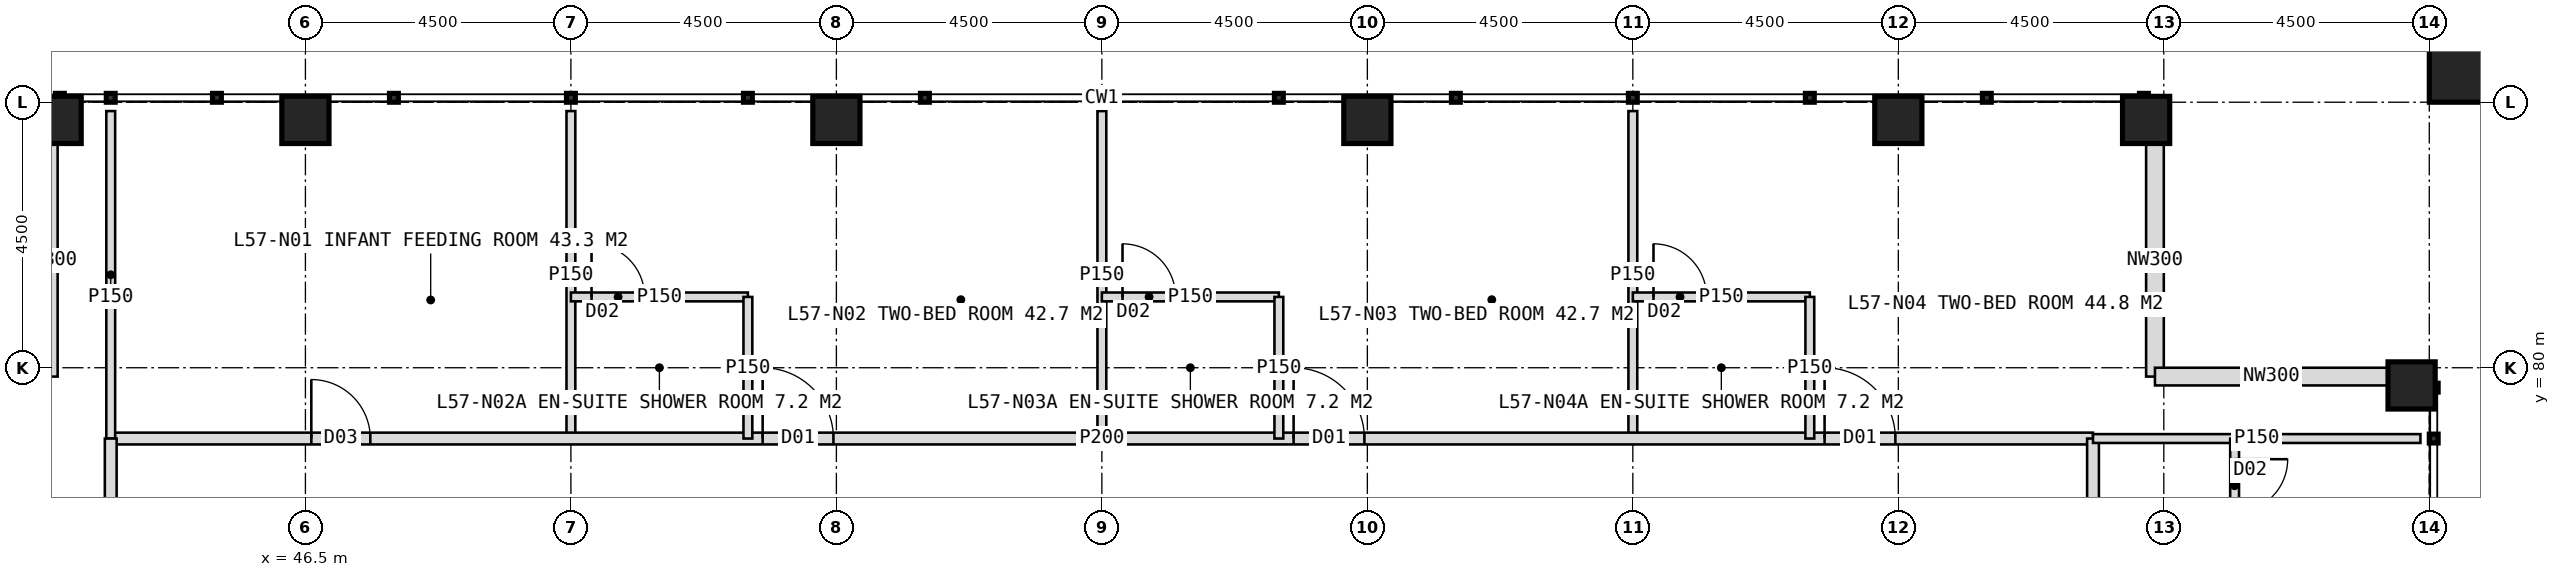
"""IFC4 building model, lengths in metres.
Left out: names, types, materials, properties, quantities, classifications, styles, units other than length and angle.
Written with IfcOpenShell. Run it as: python <this file> out.ifc"""

import sys

from ifc_helpers import new_model, si_unit, direction, frame, frame_2d, origin, origin_2d, place, context, subcontext, project, spatial, rectangle, hollow_rectangle, extrude, element, fill, save


model = new_model("IFC4")
c1 = context("Model", 3, precision=1e-05, world=origin(), true_north=direction((0.0, 1.0)))
c2 = subcontext(c1, "Body", "Model", "MODEL_VIEW")
j1 = project(units=[si_unit("LENGTHUNIT", "METRE"), si_unit("PLANEANGLEUNIT", "RADIAN")], contexts=[c1])
p1 = place(None, origin())
s1 = spatial("IfcSite", under=j1, at=p1, CompositionType="ELEMENT")
p2 = place(p1, origin())
s2 = spatial("IfcBuilding", under=s1, at=p2, CompositionType="ELEMENT")
p3 = place(p2, frame((0.0, 0.0, 237.0)))
s3 = spatial("IfcBuildingStorey", under=s2, at=p3, CompositionType="ELEMENT", Elevation=237.0)
for number, where, z_axis, x_axis in (
    (1, (42.3, 84.2, 0.0), (0.0, 0.0, 1.0), (1.0, 0.0, 0.0)),
    (2, (46.5, 84.2, 0.0), (0.0, 0.0, 1.0), (1.0, 0.0, 0.0)),
    (3, (55.5, 84.2, 0.0), (0.0, 0.0, 1.0), (1.0, 0.0, 0.0)),
    (4, (64.5, 84.2, 0.0), (0.0, 0.0, 1.0), (1.0, 0.0, 0.0)),
    (5, (73.5, 84.2, 0.0), (0.0, 0.0, 1.0), (1.0, 0.0, 0.0)),
    (6, (77.7, 84.2, 0.0), (0.0, 0.0, 1.0), (1.0, 0.0, 0.0)),
    (7, (82.2, 79.7, 0.0), (0.0, 0.0, 1.0), (1.0, 0.0, 0.0)),
):
    element("IfcColumn", number, at=place(p3, frame(where, z_axis=z_axis, x_axis=x_axis)), inside=s3, PredefinedType="COLUMN", context=c2, shape_type="SweptSolid", body=[
        extrude(hollow_rectangle(XDim=0.8, YDim=0.8, WallThickness=0.08, at=origin_2d()), origin(), (0.0, 0.0, 1.0), 4.0),
    ])
p4 = place(p3, frame((83.1, 85.1, 0.0), z_axis=(0.0, 0.0, 1.0), x_axis=(1.0, 0.0, 0.0)))
e8 = element("IfcColumn", 8, at=p4, inside=s3, PredefinedType="COLUMN", context=c2, shape_type="SweptSolid", body=[
    extrude(hollow_rectangle(XDim=1.2, YDim=1.2, WallThickness=0.07, at=origin_2d()), origin(), (0.0, 0.0, 1.0), 4.0),
])
for number, where, z_axis, x_axis in (
    (9, (77.85, 83.8, 0.0), (0.0, 0.0, 1.0), (0.0, -1.0, 0.0)),
    (10, (77.85, 79.85, 0.0), (0.0, 0.0, 1.0), (1.0, 0.0, 0.0)),
    (11, (42.15, 79.85, 0.0), (0.0, 0.0, 1.0), (0.0, 1.0, 0.0)),
):
    element("IfcWall", number, at=place(p3, frame(where, z_axis=z_axis, x_axis=x_axis)), inside=s3, PredefinedType="ELEMENTEDWALL", context=c2, shape_type="SweptSolid", body=[
        extrude(rectangle(XDim=3.95, YDim=0.3, at=frame_2d((1.975, 0.0))), origin(), (0.0, 0.0, 1.0), 2.85),
    ])
p5 = place(p3, frame((51.0, 78.8, 0.0), z_axis=(0.0, 0.0, 1.0), x_axis=(0.0, 1.0, 0.0)))
e12 = element("IfcWall", 12, at=p5, inside=s3, PredefinedType="PARTITIONING", context=c2, shape_type="SweptSolid", body=[
    extrude(rectangle(XDim=5.55, YDim=0.15, at=frame_2d((2.775, 0.0))), origin(), (0.0, 0.0, 1.0), 3.75),
])
p6 = place(p3, frame((60.0, 78.8, 0.0), z_axis=(0.0, 0.0, 1.0), x_axis=(0.0, 1.0, 0.0)))
e13 = element("IfcWall", 13, at=p6, inside=s3, PredefinedType="PARTITIONING", context=c2, shape_type="SweptSolid", body=[
    extrude(rectangle(XDim=5.55, YDim=0.15, at=frame_2d((2.775, 0.0))), origin(), (0.0, 0.0, 1.0), 2.95),
])
p7 = place(p3, frame((69.0, 78.8, 0.0), z_axis=(0.0, 0.0, 1.0), x_axis=(0.0, 1.0, 0.0)))
e14 = element("IfcWall", 14, at=p7, inside=s3, PredefinedType="PARTITIONING", context=c2, shape_type="SweptSolid", body=[
    extrude(rectangle(XDim=5.55, YDim=0.15, at=frame_2d((2.775, 0.0))), origin(), (0.0, 0.0, 1.0), 3.75),
])
p8 = place(p3, frame((43.2, 78.8, 0.0), z_axis=(0.0, 0.0, 1.0), x_axis=(1.0, 0.0, 0.0)))
e15 = element("IfcWall", 15, at=p8, inside=s3, PredefinedType="PARTITIONING", context=c2, shape_type="SweptSolid", body=[
    extrude(rectangle(XDim=33.6, YDim=0.2, at=frame_2d((16.8, 0.0))), origin(), (0.0, 0.0, 1.0), 3.75),
])
p9 = place(p8, frame((3.4, 0.0, 0.0)))
e16 = element("IfcOpeningElement", 16, at=p9, cuts=e15, PredefinedType="OPENING", context=c2, shape_type="SweptSolid", body=[
    extrude(rectangle(XDim=1.0, YDim=2.1, at=frame_2d((0.5, 1.05))), frame((0.0, 0.11, 0.0), z_axis=(0.0, -1.0, 0.0), x_axis=(1.0, 0.0, 0.0)), (0.0, 0.0, 1.0), 0.22),
])
p10 = place(p8, frame((11.05, 0.0, 0.0)))
e17 = element("IfcOpeningElement", 17, at=p10, cuts=e15, PredefinedType="OPENING", context=c2, shape_type="SweptSolid", body=[
    extrude(rectangle(XDim=1.2, YDim=2.2, at=frame_2d((0.6, 1.1))), frame((0.0, 0.11, 0.0), z_axis=(0.0, -1.0, 0.0), x_axis=(1.0, 0.0, 0.0)), (0.0, 0.0, 1.0), 0.22),
])
p11 = place(p8, frame((20.05, 0.0, 0.0)))
e18 = element("IfcOpeningElement", 18, at=p11, cuts=e15, PredefinedType="OPENING", context=c2, shape_type="SweptSolid", body=[
    extrude(rectangle(XDim=1.2, YDim=2.2, at=frame_2d((0.6, 1.1))), frame((0.0, 0.11, 0.0), z_axis=(0.0, -1.0, 0.0), x_axis=(1.0, 0.0, 0.0)), (0.0, 0.0, 1.0), 0.22),
])
p12 = place(p8, frame((29.05, 0.0, 0.0)))
e19 = element("IfcOpeningElement", 19, at=p12, cuts=e15, PredefinedType="OPENING", context=c2, shape_type="SweptSolid", body=[
    extrude(rectangle(XDim=1.2, YDim=2.2, at=frame_2d((0.6, 1.1))), frame((0.0, 0.11, 0.0), z_axis=(0.0, -1.0, 0.0), x_axis=(1.0, 0.0, 0.0)), (0.0, 0.0, 1.0), 0.22),
])
p13 = place(p3, frame((43.2, 78.8, 0.0), z_axis=(0.0, 0.0, 1.0), x_axis=(0.0, 1.0, 0.0)))
e20 = element("IfcWall", 20, at=p13, inside=s3, PredefinedType="PARTITIONING", context=c2, shape_type="SweptSolid", body=[
    extrude(rectangle(XDim=5.55, YDim=0.15, at=frame_2d((2.775, 0.0))), origin(), (0.0, 0.0, 1.0), 3.75),
])
p14 = place(p3, frame((51.0, 81.2, 0.0), z_axis=(0.0, 0.0, 1.0), x_axis=(1.0, 0.0, 0.0)))
e21 = element("IfcWall", 21, at=p14, inside=s3, PredefinedType="PARTITIONING", context=c2, shape_type="SweptSolid", body=[
    extrude(rectangle(XDim=3.0, YDim=0.15, at=frame_2d((1.5, 0.0))), origin(), (0.0, 0.0, 1.0), 3.75),
])
p15 = place(p14, frame((0.35, 0.0, 0.0)))
e22 = element("IfcOpeningElement", 22, at=p15, cuts=e21, PredefinedType="OPENING", context=c2, shape_type="SweptSolid", body=[
    extrude(rectangle(XDim=0.9, YDim=2.1, at=frame_2d((0.45, 1.05))), frame((0.0, 0.085, 0.0), z_axis=(0.0, -1.0, 0.0), x_axis=(1.0, 0.0, 0.0)), (0.0, 0.0, 1.0), 0.17),
])
p16 = place(p3, frame((54.0, 78.8, 0.0), z_axis=(0.0, 0.0, 1.0), x_axis=(0.0, 1.0, 0.0)))
e23 = element("IfcWall", 23, at=p16, inside=s3, PredefinedType="PARTITIONING", context=c2, shape_type="SweptSolid", body=[
    extrude(rectangle(XDim=2.4, YDim=0.15, at=frame_2d((1.2, 0.0))), origin(), (0.0, 0.0, 1.0), 3.75),
])
p17 = place(p3, frame((60.0, 81.2, 0.0), z_axis=(0.0, 0.0, 1.0), x_axis=(1.0, 0.0, 0.0)))
e24 = element("IfcWall", 24, at=p17, inside=s3, PredefinedType="PARTITIONING", context=c2, shape_type="SweptSolid", body=[
    extrude(rectangle(XDim=3.0, YDim=0.15, at=frame_2d((1.5, 0.0))), origin(), (0.0, 0.0, 1.0), 3.75),
])
p18 = place(p17, frame((0.35, 0.0, 0.0)))
e25 = element("IfcOpeningElement", 25, at=p18, cuts=e24, PredefinedType="OPENING", context=c2, shape_type="SweptSolid", body=[
    extrude(rectangle(XDim=0.9, YDim=2.1, at=frame_2d((0.45, 1.05))), frame((0.0, 0.085, 0.0), z_axis=(0.0, -1.0, 0.0), x_axis=(1.0, 0.0, 0.0)), (0.0, 0.0, 1.0), 0.17),
])
p19 = place(p3, frame((63.0, 78.8, 0.0), z_axis=(0.0, 0.0, 1.0), x_axis=(0.0, 1.0, 0.0)))
e26 = element("IfcWall", 26, at=p19, inside=s3, PredefinedType="PARTITIONING", context=c2, shape_type="SweptSolid", body=[
    extrude(rectangle(XDim=2.4, YDim=0.15, at=frame_2d((1.2, 0.0))), origin(), (0.0, 0.0, 1.0), 3.75),
])
p20 = place(p3, frame((69.0, 81.2, 0.0), z_axis=(0.0, 0.0, 1.0), x_axis=(1.0, 0.0, 0.0)))
e27 = element("IfcWall", 27, at=p20, inside=s3, PredefinedType="PARTITIONING", context=c2, shape_type="SweptSolid", body=[
    extrude(rectangle(XDim=3.0, YDim=0.15, at=frame_2d((1.5, 0.0))), origin(), (0.0, 0.0, 1.0), 3.75),
])
p21 = place(p20, frame((0.35, 0.0, 0.0)))
e28 = element("IfcOpeningElement", 28, at=p21, cuts=e27, PredefinedType="OPENING", context=c2, shape_type="SweptSolid", body=[
    extrude(rectangle(XDim=0.9, YDim=2.1, at=frame_2d((0.45, 1.05))), frame((0.0, 0.085, 0.0), z_axis=(0.0, -1.0, 0.0), x_axis=(1.0, 0.0, 0.0)), (0.0, 0.0, 1.0), 0.17),
])
p22 = place(p3, frame((72.0, 78.8, 0.0), z_axis=(0.0, 0.0, 1.0), x_axis=(0.0, 1.0, 0.0)))
e29 = element("IfcWall", 29, at=p22, inside=s3, PredefinedType="PARTITIONING", context=c2, shape_type="SweptSolid", body=[
    extrude(rectangle(XDim=2.4, YDim=0.15, at=frame_2d((1.2, 0.0))), origin(), (0.0, 0.0, 1.0), 3.75),
])
p23 = place(p3, frame((43.2, 45.2, 0.0), z_axis=(0.0, 0.0, 1.0), x_axis=(0.0, 1.0, 0.0)))
e30 = element("IfcWall", 30, at=p23, inside=s3, PredefinedType="PARTITIONING", context=c2, shape_type="SweptSolid", body=[
    extrude(rectangle(XDim=33.6, YDim=0.2, at=frame_2d((16.8, 0.0))), origin(), (0.0, 0.0, 1.0), 3.75),
])
p24 = place(p23, frame((2.65, 0.0, 0.0)))
e31 = element("IfcOpeningElement", 31, at=p24, cuts=e30, PredefinedType="OPENING", context=c2, shape_type="SweptSolid", body=[
    extrude(rectangle(XDim=1.2, YDim=2.2, at=frame_2d((0.6, 1.1))), frame((0.0, 0.11, 0.0), z_axis=(0.0, -1.0, 0.0), x_axis=(1.0, 0.0, 0.0)), (0.0, 0.0, 1.0), 0.22),
])
p25 = place(p23, frame((7.45, 0.0, 0.0)))
e32 = element("IfcOpeningElement", 32, at=p25, cuts=e30, PredefinedType="OPENING", context=c2, shape_type="SweptSolid", body=[
    extrude(rectangle(XDim=1.2, YDim=2.2, at=frame_2d((0.6, 1.1))), frame((0.0, 0.11, 0.0), z_axis=(0.0, -1.0, 0.0), x_axis=(1.0, 0.0, 0.0)), (0.0, 0.0, 1.0), 0.22),
])
p26 = place(p23, frame((13.45, 0.0, 0.0)))
e33 = element("IfcOpeningElement", 33, at=p26, cuts=e30, PredefinedType="OPENING", context=c2, shape_type="SweptSolid", body=[
    extrude(rectangle(XDim=1.2, YDim=2.2, at=frame_2d((0.6, 1.1))), frame((0.0, 0.11, 0.0), z_axis=(0.0, -1.0, 0.0), x_axis=(1.0, 0.0, 0.0)), (0.0, 0.0, 1.0), 0.22),
])
p27 = place(p23, frame((20.05, 0.0, 0.0)))
e34 = element("IfcOpeningElement", 34, at=p27, cuts=e30, PredefinedType="OPENING", context=c2, shape_type="SweptSolid", body=[
    extrude(rectangle(XDim=1.2, YDim=2.2, at=frame_2d((0.6, 1.1))), frame((0.0, 0.11, 0.0), z_axis=(0.0, -1.0, 0.0), x_axis=(1.0, 0.0, 0.0)), (0.0, 0.0, 1.0), 0.22),
])
p28 = place(p23, frame((29.05, 0.0, 0.0)))
e35 = element("IfcOpeningElement", 35, at=p28, cuts=e30, PredefinedType="OPENING", context=c2, shape_type="SweptSolid", body=[
    extrude(rectangle(XDim=1.2, YDim=2.2, at=frame_2d((0.6, 1.1))), frame((0.0, 0.11, 0.0), z_axis=(0.0, -1.0, 0.0), x_axis=(1.0, 0.0, 0.0)), (0.0, 0.0, 1.0), 0.22),
])
p29 = place(p3, frame((76.8, 78.8, 0.0), z_axis=(0.0, 0.0, 1.0), x_axis=(0.0, -1.0, 0.0)))
e36 = element("IfcWall", 36, at=p29, inside=s3, PredefinedType="PARTITIONING", context=c2, shape_type="SweptSolid", body=[
    extrude(rectangle(XDim=33.6, YDim=0.2, at=frame_2d((16.8, 0.0))), origin(), (0.0, 0.0, 1.0), 3.75),
])
p30 = place(p29, frame((2.65, 0.0, 0.0)))
e37 = element("IfcOpeningElement", 37, at=p30, cuts=e36, PredefinedType="OPENING", context=c2, shape_type="SweptSolid", body=[
    extrude(rectangle(XDim=1.2, YDim=2.2, at=frame_2d((0.6, 1.1))), frame((0.0, 0.11, 0.0), z_axis=(0.0, -1.0, 0.0), x_axis=(1.0, 0.0, 0.0)), (0.0, 0.0, 1.0), 0.22),
])
p31 = place(p29, frame((7.45, 0.0, 0.0)))
e38 = element("IfcOpeningElement", 38, at=p31, cuts=e36, PredefinedType="OPENING", context=c2, shape_type="SweptSolid", body=[
    extrude(rectangle(XDim=1.2, YDim=2.2, at=frame_2d((0.6, 1.1))), frame((0.0, 0.11, 0.0), z_axis=(0.0, -1.0, 0.0), x_axis=(1.0, 0.0, 0.0)), (0.0, 0.0, 1.0), 0.22),
])
p32 = place(p29, frame((13.45, 0.0, 0.0)))
e39 = element("IfcOpeningElement", 39, at=p32, cuts=e36, PredefinedType="OPENING", context=c2, shape_type="SweptSolid", body=[
    extrude(rectangle(XDim=1.2, YDim=2.2, at=frame_2d((0.6, 1.1))), frame((0.0, 0.11, 0.0), z_axis=(0.0, -1.0, 0.0), x_axis=(1.0, 0.0, 0.0)), (0.0, 0.0, 1.0), 0.22),
])
p33 = place(p29, frame((20.05, 0.0, 0.0)))
e40 = element("IfcOpeningElement", 40, at=p33, cuts=e36, PredefinedType="OPENING", context=c2, shape_type="SweptSolid", body=[
    extrude(rectangle(XDim=1.2, YDim=2.2, at=frame_2d((0.6, 1.1))), frame((0.0, 0.11, 0.0), z_axis=(0.0, -1.0, 0.0), x_axis=(1.0, 0.0, 0.0)), (0.0, 0.0, 1.0), 0.22),
])
p34 = place(p29, frame((29.05, 0.0, 0.0)))
e41 = element("IfcOpeningElement", 41, at=p34, cuts=e36, PredefinedType="OPENING", context=c2, shape_type="SweptSolid", body=[
    extrude(rectangle(XDim=1.2, YDim=2.2, at=frame_2d((0.6, 1.1))), frame((0.0, 0.11, 0.0), z_axis=(0.0, -1.0, 0.0), x_axis=(1.0, 0.0, 0.0)), (0.0, 0.0, 1.0), 0.22),
])
p35 = place(p3, frame((76.8, 78.8, 0.0), z_axis=(0.0, 0.0, 1.0), x_axis=(1.0, 0.0, 0.0)))
e42 = element("IfcWall", 42, at=p35, inside=s3, PredefinedType="PARTITIONING", context=c2, shape_type="SweptSolid", body=[
    extrude(rectangle(XDim=5.55, YDim=0.15, at=frame_2d((2.775, 0.0))), origin(), (0.0, 0.0, 1.0), 3.75),
])
p36 = place(p3, frame((79.2, 78.8, 0.0), z_axis=(0.0, 0.0, 1.0), x_axis=(0.0, -1.0, 0.0)))
e43 = element("IfcWall", 43, at=p36, inside=s3, PredefinedType="PARTITIONING", context=c2, shape_type="SweptSolid", body=[
    extrude(rectangle(XDim=2.4, YDim=0.15, at=frame_2d((1.2, 0.0))), origin(), (0.0, 0.0, 1.0), 3.75),
])
p37 = place(p36, frame((0.35, 0.0, 0.0)))
e44 = element("IfcOpeningElement", 44, at=p37, cuts=e43, PredefinedType="OPENING", context=c2, shape_type="SweptSolid", body=[
    extrude(rectangle(XDim=0.9, YDim=2.1, at=frame_2d((0.45, 1.05))), frame((0.0, 0.085, 0.0), z_axis=(0.0, -1.0, 0.0), x_axis=(1.0, 0.0, 0.0)), (0.0, 0.0, 1.0), 0.17),
])
p38 = place(p9, origin())
e45 = element("IfcDoor", 45, at=p38, inside=s3, OperationType="SINGLE_SWING_LEFT", PredefinedType="DOOR", context=c2, shape_type="SweptSolid", body=[
    extrude(rectangle(XDim=1.0, YDim=2.1, at=frame_2d((0.5, 1.05))), frame((0.0, 0.025, 0.0), z_axis=(0.0, -1.0, 0.0), x_axis=(1.0, 0.0, 0.0)), (0.0, 0.0, 1.0), 0.05),
])
fill(e16, e45)
p39 = place(p10, origin())
e46 = element("IfcDoor", 46, at=p39, inside=s3, OperationType="SINGLE_SWING_LEFT", PredefinedType="DOOR", context=c2, shape_type="SweptSolid", body=[
    extrude(rectangle(XDim=1.2, YDim=2.2, at=frame_2d((0.6, 1.1))), frame((0.0, 0.025, 0.0), z_axis=(0.0, -1.0, 0.0), x_axis=(1.0, 0.0, 0.0)), (0.0, 0.0, 1.0), 0.05),
])
fill(e17, e46)
p40 = place(p15, origin())
e47 = element("IfcDoor", 47, at=p40, inside=s3, OperationType="SINGLE_SWING_LEFT", PredefinedType="DOOR", context=c2, shape_type="SweptSolid", body=[
    extrude(rectangle(XDim=0.9, YDim=2.1, at=frame_2d((0.45, 1.05))), frame((0.0, 0.025, 0.0), z_axis=(0.0, -1.0, 0.0), x_axis=(1.0, 0.0, 0.0)), (0.0, 0.0, 1.0), 0.05),
])
fill(e22, e47)
p41 = place(p11, origin())
e48 = element("IfcDoor", 48, at=p41, inside=s3, OperationType="SINGLE_SWING_LEFT", PredefinedType="DOOR", context=c2, shape_type="SweptSolid", body=[
    extrude(rectangle(XDim=1.2, YDim=2.2, at=frame_2d((0.6, 1.1))), frame((0.0, 0.025, 0.0), z_axis=(0.0, -1.0, 0.0), x_axis=(1.0, 0.0, 0.0)), (0.0, 0.0, 1.0), 0.05),
])
fill(e18, e48)
p42 = place(p18, origin())
e49 = element("IfcDoor", 49, at=p42, inside=s3, OperationType="SINGLE_SWING_LEFT", PredefinedType="DOOR", context=c2, shape_type="SweptSolid", body=[
    extrude(rectangle(XDim=0.9, YDim=2.1, at=frame_2d((0.45, 1.05))), frame((0.0, 0.025, 0.0), z_axis=(0.0, -1.0, 0.0), x_axis=(1.0, 0.0, 0.0)), (0.0, 0.0, 1.0), 0.05),
])
fill(e25, e49)
p43 = place(p12, origin())
e50 = element("IfcDoor", 50, at=p43, inside=s3, OperationType="SINGLE_SWING_LEFT", PredefinedType="DOOR", context=c2, shape_type="SweptSolid", body=[
    extrude(rectangle(XDim=1.2, YDim=2.2, at=frame_2d((0.6, 1.1))), frame((0.0, 0.025, 0.0), z_axis=(0.0, -1.0, 0.0), x_axis=(1.0, 0.0, 0.0)), (0.0, 0.0, 1.0), 0.05),
])
fill(e19, e50)
p44 = place(p21, origin())
e51 = element("IfcDoor", 51, at=p44, inside=s3, OperationType="SINGLE_SWING_LEFT", PredefinedType="DOOR", context=c2, shape_type="SweptSolid", body=[
    extrude(rectangle(XDim=0.9, YDim=2.1, at=frame_2d((0.45, 1.05))), frame((0.0, 0.025, 0.0), z_axis=(0.0, -1.0, 0.0), x_axis=(1.0, 0.0, 0.0)), (0.0, 0.0, 1.0), 0.05),
])
fill(e28, e51)
p45 = place(p37, origin())
e52 = element("IfcDoor", 52, at=p45, inside=s3, OperationType="SINGLE_SWING_LEFT", PredefinedType="DOOR", context=c2, shape_type="SweptSolid", body=[
    extrude(rectangle(XDim=0.9, YDim=2.1, at=frame_2d((0.45, 1.05))), frame((0.0, 0.025, 0.0), z_axis=(0.0, -1.0, 0.0), x_axis=(1.0, 0.0, 0.0)), (0.0, 0.0, 1.0), 0.05),
])
fill(e44, e52)
save(model, sys.argv[1])
